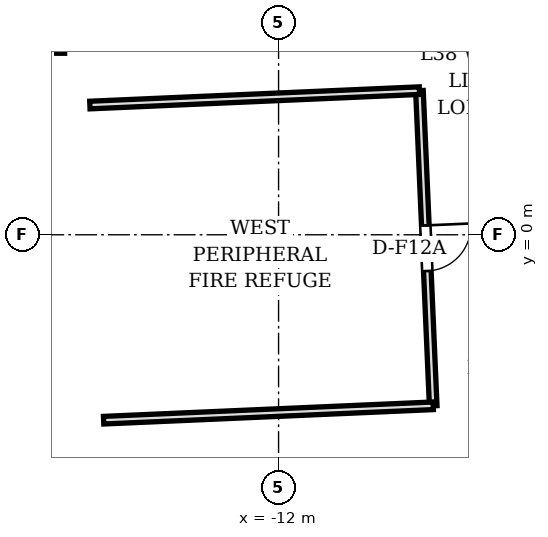
"""IFC4 building model, lengths in metres.
Left out: names, types, materials, properties, quantities, classifications, styles, units other than length and angle.
Written with IfcOpenShell. Run it as: python <this file> out.ifc"""

import sys

from ifc_helpers import new_model, si_unit, direction, frame, frame_2d, origin, origin_2d, place, context, subcontext, project, spatial, rectangle, i_section, extrude, source, transform, mapped, element, fill, save


model = new_model("IFC4")
c1 = context("Model", 3, precision=1e-05, world=origin(), true_north=direction((0.0, 1.0)))
c2 = subcontext(c1, "Body", "Model", "MODEL_VIEW")
j1 = project(units=[si_unit("LENGTHUNIT", "METRE"), si_unit("PLANEANGLEUNIT", "RADIAN")], contexts=[c1])
p1 = place(None, origin())
s1 = spatial("IfcSite", under=j1, at=p1, CompositionType="ELEMENT")
p2 = place(p1, origin())
s2 = spatial("IfcBuilding", under=s1, at=p2, CompositionType="ELEMENT")
p3 = place(p2, frame((0.0, 0.0, 138.25)))
s3 = spatial("IfcBuildingStorey", under=s2, at=p3, CompositionType="ELEMENT", Elevation=138.25)
m1 = source(origin(), c2, "Body", "SweptSolid", [
    extrude(i_section(OverallWidth=0.25, OverallDepth=0.45, WebThickness=0.014, FlangeThickness=0.014, FilletRadius=0.015, at=origin_2d()), origin(), (0.0, 0.0, 1.0), 4.18),
])
p4 = place(p3, frame((-17.734, 4.981, 0.0), z_axis=(0.0, 0.0, 1.0), x_axis=(1.0, 0.0, 0.0)))
e1 = element("IfcColumn", 1, at=p4, inside=s3, PredefinedType="COLUMN", context=c2, shape_type="MappedRepresentation", body=[
    mapped(m1, transform((0.0, 0.0, 0.0), scale=1.0)),
])
p5 = place(p3, frame((-8.293, 3.792, 0.0), z_axis=(0.0, 0.0, 1.0), x_axis=(0.043591675458, -0.999049431125, 0.0)))
e2 = element("IfcWall", 2, at=p5, inside=s3, PredefinedType="SOLIDWALL", context=c2, shape_type="SweptSolid", body=[
    extrude(rectangle(XDim=8.3, YDim=0.2, at=frame_2d((4.15, 0.0))), origin(), (0.0, 0.0, 1.0), 3.73),
])
p6 = place(p5, frame((3.55, 0.0, 0.0)))
e3 = element("IfcOpeningElement", 3, at=p6, cuts=e2, PredefinedType="OPENING", context=c2, shape_type="SweptSolid", body=[
    extrude(rectangle(XDim=1.2, YDim=2.2, at=frame_2d((0.6, 1.1))), frame((0.0, 0.11, 0.0), z_axis=(0.0, -1.0, 0.0), x_axis=(1.0, 0.0, 0.0)), (0.0, 0.0, 1.0), 0.22),
])
p7 = place(p3, frame((-7.931, -4.5, 0.0), z_axis=(0.0, 0.0, 1.0), x_axis=(-0.999047967879, -0.04362519773, 0.0)))
e4 = element("IfcWall", 4, at=p7, inside=s3, PredefinedType="SOLIDWALL", context=c2, shape_type="SweptSolid", body=[
    extrude(rectangle(XDim=8.68, YDim=0.2, at=frame_2d((4.34, 0.0))), origin(), (0.0, 0.0, 1.0), 2.65),
])
p8 = place(p3, frame((-8.293, 3.792, 0.0), z_axis=(0.0, 0.0, 1.0), x_axis=(-0.999046795199, -0.043652044655, 0.0)))
e5 = element("IfcWall", 5, at=p8, inside=s3, PredefinedType="SOLIDWALL", context=c2, shape_type="SweptSolid", body=[
    extrude(rectangle(XDim=8.68, YDim=0.2, at=frame_2d((4.34, 0.0))), origin(), (0.0, 0.0, 1.0), 2.65),
])
m2 = source(origin(), c2, "Body", "SweptSolid", [
    extrude(rectangle(XDim=1.2, YDim=0.05, at=origin_2d()), origin(), (0.0, 0.0, 1.0), 2.2),
])
p9 = place(p6, frame((0.6, 0.0, 0.0)))
e6 = element("IfcDoor", 6, at=p9, inside=s3, OperationType="SINGLE_SWING_LEFT", PredefinedType="DOOR", context=c2, shape_type="MappedRepresentation", body=[
    mapped(m2, transform((0.0, 0.0, 0.0), scale=1.0)),
])
fill(e3, e6)
save(model, sys.argv[1])
